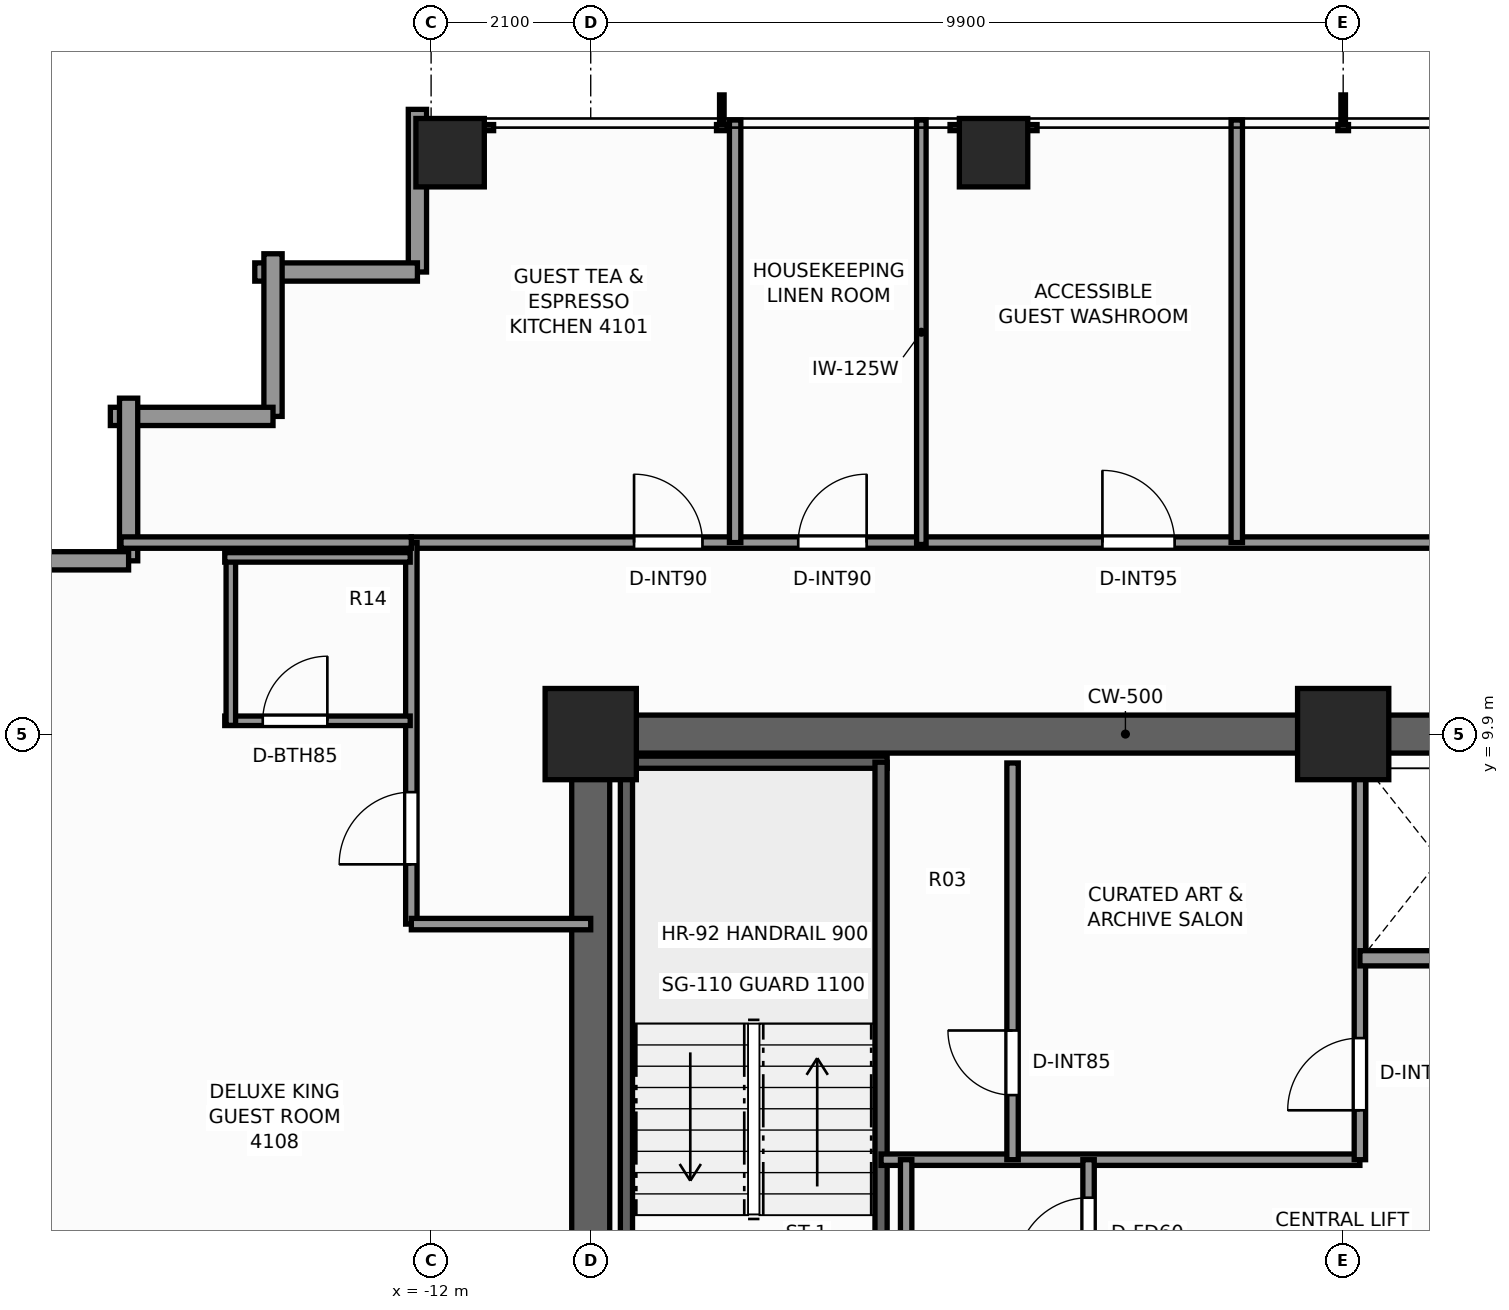
"""IFC4 building model, lengths in metres.
Left out: names, types, materials, properties, quantities, classifications, styles, units other than length and angle.
Written with IfcOpenShell. Run it as: python <this file> out.ifc"""

import sys

from ifc_helpers import new_model, si_unit, direction, frame, frame_2d, origin, origin_2d, place, context, subcontext, project, spatial, rectangle, extrude, element, fill, save


model = new_model("IFC4")
c1 = context("Model", 3, precision=1e-05, world=origin(), true_north=direction((0.0, 1.0)))
c2 = subcontext(c1, "Body", "Model", "MODEL_VIEW")
j1 = project(units=[si_unit("LENGTHUNIT", "METRE"), si_unit("PLANEANGLEUNIT", "RADIAN")], contexts=[c1])
p1 = place(None, origin())
s1 = spatial("IfcSite", under=j1, at=p1, CompositionType="ELEMENT")
p2 = place(p1, origin())
s2 = spatial("IfcBuilding", under=s1, at=p2, CompositionType="ELEMENT")
p3 = place(p2, frame((0.0, 0.0, 141.5)))
s3 = spatial("IfcBuildingStorey", under=s2, at=p3, CompositionType="ELEMENT", Elevation=141.5)
p4 = place(p3, frame((-10.15, 9.9, 0.0), z_axis=(0.0, 0.0, 1.0), x_axis=(1.0, 0.0, 0.0)))
e1 = element("IfcWall", 1, at=p4, inside=s3, PredefinedType="SHEAR", context=c2, shape_type="SweptSolid", body=[
    extrude(rectangle(XDim=14.57, YDim=0.5, at=frame_2d((7.285, 0.0))), origin(), (0.0, 0.0, 1.0), 3.3),
])
p5 = place(p3, frame((-9.9, -3.7, 0.0), z_axis=(0.0, 0.0, 1.0), x_axis=(0.0, 1.0, 0.0)))
e2 = element("IfcWall", 2, at=p5, inside=s3, PredefinedType="SHEAR", context=c2, shape_type="SweptSolid", body=[
    extrude(rectangle(XDim=13.35, YDim=0.5, at=frame_2d((6.675, 0.0))), origin(), (0.0, 0.0, 1.0), 3.3),
])
p6 = place(p5, frame((0.35, 0.0, 0.0)))
e3 = element("IfcOpeningElement", 3, at=p6, cuts=e2, PredefinedType="OPENING", context=c2, shape_type="SweptSolid", body=[
    extrude(rectangle(XDim=1.1, YDim=2.2, at=frame_2d((0.55, 1.1))), frame((0.0, 0.26, 0.0), z_axis=(0.0, -1.0, 0.0), x_axis=(1.0, 0.0, 0.0)), (0.0, 0.0, 1.0), 0.52),
])
for number, where, z_axis, x_axis in (
    (4, (-9.9, 9.9, 0.0), (0.0, 0.0, 1.0), (1.0, 0.0, 0.0)),
    (5, (0.0, 9.9, 0.0), (0.0, 0.0, 1.0), (1.0, 0.0, 0.0)),
):
    element("IfcColumn", number, at=place(p3, frame(where, z_axis=z_axis, x_axis=x_axis)), inside=s3, PredefinedType="COLUMN", context=c2, shape_type="SweptSolid", body=[
        extrude(rectangle(XDim=1.2, YDim=1.2, at=origin_2d()), origin(), (0.0, 0.0, 1.0), 3.3),
    ])
for number, where, z_axis, x_axis in (
    (6, (-11.75, 17.55, 0.0), (0.0, 0.0, 1.0), (1.0, 0.0, 0.0)),
    (7, (-4.6, 17.55, 0.0), (0.0, 0.0, 1.0), (1.0, 0.0, 0.0)),
):
    element("IfcColumn", number, at=place(p3, frame(where, z_axis=z_axis, x_axis=x_axis)), inside=s3, PredefinedType="COLUMN", context=c2, shape_type="SweptSolid", body=[
        extrude(rectangle(XDim=0.9, YDim=0.9, at=origin_2d()), origin(), (0.0, 0.0, 1.0), 3.3),
    ])
for number, where, z_axis, x_axis in (
    (8, (-12.18, 15.98, 0.0), (0.0, 0.0, 1.0), (0.0, 1.0, 0.0)),
    (9, (-14.32, 15.98, 0.0), (0.0, 0.0, 1.0), (1.0, 0.0, 0.0)),
):
    element("IfcWall", number, at=place(p3, frame(where, z_axis=z_axis, x_axis=x_axis)), inside=s3, PredefinedType="STANDARD", context=c2, shape_type="SweptSolid", body=[
        extrude(rectangle(XDim=2.14, YDim=0.24, at=frame_2d((1.07, 0.0))), origin(), (0.0, 0.0, 1.0), 2.479),
    ])
for number, where, z_axis, x_axis in (
    (10, (-14.08, 14.08, 0.0), (0.0, 0.0, 1.0), (0.0, 1.0, 0.0)),
    (11, (-16.22, 14.08, 0.0), (0.0, 0.0, 1.0), (1.0, 0.0, 0.0)),
):
    element("IfcWall", number, at=place(p3, frame(where, z_axis=z_axis, x_axis=x_axis)), inside=s3, PredefinedType="STANDARD", context=c2, shape_type="SweptSolid", body=[
        extrude(rectangle(XDim=2.14, YDim=0.24, at=frame_2d((1.07, 0.0))), origin(), (0.0, 0.0, 1.0), 2.479),
    ])
for number, where, z_axis, x_axis in (
    (12, (-15.98, 12.18, 0.0), (0.0, 0.0, 1.0), (0.0, 1.0, 0.0)),
    (13, (-18.12, 12.18, 0.0), (0.0, 0.0, 1.0), (1.0, 0.0, 0.0)),
):
    element("IfcWall", number, at=place(p3, frame(where, z_axis=z_axis, x_axis=x_axis)), inside=s3, PredefinedType="STANDARD", context=c2, shape_type="SweptSolid", body=[
        extrude(rectangle(XDim=2.14, YDim=0.24, at=frame_2d((1.07, 0.0))), origin(), (0.0, 0.0, 1.0), 2.479),
    ])
p7 = place(p3, frame((-9.52, 9.53, 0.0), z_axis=(0.0, 0.0, 1.0), x_axis=(1.0, 0.0, 0.0)))
e14 = element("IfcWall", 14, at=p7, inside=s3, PredefinedType="SHEAR", context=c2, shape_type="SweptSolid", body=[
    extrude(rectangle(XDim=3.52, YDim=0.16, at=frame_2d((1.76, 0.0))), origin(), (0.0, 0.0, 1.0), 3.3),
])
for number, where, z_axis, x_axis in (
    (15, (-9.43, 1.97, 0.0), (0.0, 0.0, 1.0), (0.0, 1.0, 0.0)),
    (16, (-6.08, 1.97, 0.0), (0.0, 0.0, 1.0), (0.0, 1.0, 0.0)),
):
    element("IfcWall", number, at=place(p3, frame(where, z_axis=z_axis, x_axis=x_axis)), inside=s3, PredefinedType="SHEAR", context=c2, shape_type="SweptSolid", body=[
        extrude(rectangle(XDim=7.56, YDim=0.16, at=frame_2d((3.78, 0.0))), origin(), (0.0, 0.0, 1.0), 3.3),
    ])
p8 = place(p3, frame((-6.08, 4.3, 0.0), z_axis=(0.0, 0.0, 1.0), x_axis=(1.0, 0.0, 0.0)))
e17 = element("IfcWall", 17, at=p8, inside=s3, PredefinedType="PARTITIONING", context=c2, shape_type="SweptSolid", body=[
    extrude(rectangle(XDim=6.3, YDim=0.15, at=frame_2d((3.15, 0.0))), origin(), (0.0, 0.0, 1.0), 3.1),
])
p9 = place(p3, frame((0.22, 4.3, 0.0), z_axis=(0.0, 0.0, 1.0), x_axis=(0.0, 1.0, 0.0)))
e18 = element("IfcWall", 18, at=p9, inside=s3, PredefinedType="PARTITIONING", context=c2, shape_type="SweptSolid", body=[
    extrude(rectangle(XDim=5.22, YDim=0.15, at=frame_2d((2.61, 0.0))), origin(), (0.0, 0.0, 1.0), 3.1),
])
p10 = place(p9, frame((0.65, 0.0, 0.0)))
e19 = element("IfcOpeningElement", 19, at=p10, cuts=e18, PredefinedType="OPENING", context=c2, shape_type="SweptSolid", body=[
    extrude(rectangle(XDim=0.95, YDim=2.06, at=frame_2d((0.475, 1.03))), frame((0.0, 0.085, 0.0), z_axis=(0.0, -1.0, 0.0), x_axis=(1.0, 0.0, 0.0)), (0.0, 0.0, 1.0), 0.17),
])
p11 = place(p3, frame((-4.35, 4.3, 0.0), z_axis=(0.0, 0.0, 1.0), x_axis=(0.0, 1.0, 0.0)))
e20 = element("IfcWall", 20, at=p11, inside=s3, PredefinedType="PARTITIONING", context=c2, shape_type="SweptSolid", body=[
    extrude(rectangle(XDim=5.22, YDim=0.15, at=frame_2d((2.61, 0.0))), origin(), (0.0, 0.0, 1.0), 3.1),
])
p12 = place(p11, frame((0.85, 0.0, 0.0)))
e21 = element("IfcOpeningElement", 21, at=p12, cuts=e20, PredefinedType="OPENING", context=c2, shape_type="SweptSolid", body=[
    extrude(rectangle(XDim=0.85, YDim=2.03, at=frame_2d((0.425, 1.015))), frame((0.0, 0.085, 0.0), z_axis=(0.0, -1.0, 0.0), x_axis=(1.0, 0.0, 0.0)), (0.0, 0.0, 1.0), 0.17),
])
p13 = place(p3, frame((0.22, 6.95, 0.0), z_axis=(0.0, 0.0, 1.0), x_axis=(1.0, 0.0, 0.0)))
e22 = element("IfcWall", 22, at=p13, inside=s3, PredefinedType="SOLIDWALL", context=c2, shape_type="SweptSolid", body=[
    extrude(rectangle(XDim=4.18, YDim=0.2, at=frame_2d((2.09, 0.0))), origin(), (0.0, 0.0, 1.0), 3.1),
])
p14 = place(p3, frame((-3.35, 1.1, 0.0), z_axis=(0.0, 0.0, 1.0), x_axis=(0.0, 1.0, 0.0)))
e23 = element("IfcWall", 23, at=p14, inside=s3, PredefinedType="PARTITIONING", context=c2, shape_type="SweptSolid", body=[
    extrude(rectangle(XDim=3.2, YDim=0.15, at=frame_2d((1.6, 0.0))), origin(), (0.0, 0.0, 1.0), 2.735),
])
p15 = place(p14, frame((1.75, 0.0, 0.0)))
e24 = element("IfcOpeningElement", 24, at=p15, cuts=e23, PredefinedType="OPENING", context=c2, shape_type="SweptSolid", body=[
    extrude(rectangle(XDim=0.95, YDim=2.06, at=frame_2d((0.475, 1.03))), frame((0.0, 0.085, 0.0), z_axis=(0.0, -1.0, 0.0), x_axis=(1.0, 0.0, 0.0)), (0.0, 0.0, 1.0), 0.17),
])
p16 = place(p3, frame((-5.75, 1.97, 0.0), z_axis=(0.0, 0.0, 1.0), x_axis=(0.0, 1.0, 0.0)))
e25 = element("IfcWall", 25, at=p16, inside=s3, PredefinedType="PARTITIONING", context=c2, shape_type="SweptSolid", body=[
    extrude(rectangle(XDim=2.33, YDim=0.15, at=frame_2d((1.165, 0.0))), origin(), (0.0, 0.0, 1.0), 2.735),
])
p17 = place(p3, frame((-12.26, 12.42, 0.0), z_axis=(0.0, 0.0, 1.0), x_axis=(1.0, 0.0, 0.0)))
e26 = element("IfcWall", 26, at=p17, inside=s3, PredefinedType="PARTITIONING", context=c2, shape_type="SweptSolid", body=[
    extrude(rectangle(XDim=24.68, YDim=0.15, at=frame_2d((12.34, 0.0))), origin(), (0.0, 0.0, 1.0), 2.312),
])
p18 = place(p17, frame((2.93, 0.0, 0.0)))
e27 = element("IfcOpeningElement", 27, at=p18, cuts=e26, PredefinedType="OPENING", context=c2, shape_type="SweptSolid", body=[
    extrude(rectangle(XDim=0.9, YDim=2.06, at=frame_2d((0.45, 1.03))), frame((0.0, 0.085, 0.0), z_axis=(0.0, -1.0, 0.0), x_axis=(1.0, 0.0, 0.0)), (0.0, 0.0, 1.0), 0.17),
])
p19 = place(p17, frame((5.09, 0.0, 0.0)))
e28 = element("IfcOpeningElement", 28, at=p19, cuts=e26, PredefinedType="OPENING", context=c2, shape_type="SweptSolid", body=[
    extrude(rectangle(XDim=0.9, YDim=2.06, at=frame_2d((0.45, 1.03))), frame((0.0, 0.085, 0.0), z_axis=(0.0, -1.0, 0.0), x_axis=(1.0, 0.0, 0.0)), (0.0, 0.0, 1.0), 0.17),
])
p20 = place(p17, frame((9.092, 0.0, 0.0)))
e29 = element("IfcOpeningElement", 29, at=p20, cuts=e26, PredefinedType="OPENING", context=c2, shape_type="SweptSolid", body=[
    extrude(rectangle(XDim=0.95, YDim=2.06, at=frame_2d((0.475, 1.03))), frame((0.0, 0.085, 0.0), z_axis=(0.0, -1.0, 0.0), x_axis=(1.0, 0.0, 0.0)), (0.0, 0.0, 1.0), 0.17),
])
p21 = place(p17, frame((13.84, 0.0, 0.0)))
e30 = element("IfcOpeningElement", 30, at=p21, cuts=e26, PredefinedType="OPENING", context=c2, shape_type="SweptSolid", body=[
    extrude(rectangle(XDim=0.9, YDim=2.06, at=frame_2d((0.45, 1.03))), frame((0.0, 0.085, 0.0), z_axis=(0.0, -1.0, 0.0), x_axis=(1.0, 0.0, 0.0)), (0.0, 0.0, 1.0), 0.17),
])
p22 = place(p17, frame((20.256, 0.0, 0.0)))
e31 = element("IfcOpeningElement", 31, at=p22, cuts=e26, PredefinedType="OPENING", context=c2, shape_type="SweptSolid", body=[
    extrude(rectangle(XDim=0.9, YDim=2.06, at=frame_2d((0.45, 1.03))), frame((0.0, 0.085, 0.0), z_axis=(0.0, -1.0, 0.0), x_axis=(1.0, 0.0, 0.0)), (0.0, 0.0, 1.0), 0.17),
])
p23 = place(p3, frame((-12.26, 7.4, 0.0), z_axis=(0.0, 0.0, 1.0), x_axis=(0.0, 1.0, 0.0)))
e32 = element("IfcWall", 32, at=p23, inside=s3, PredefinedType="PARTITIONING", context=c2, shape_type="SweptSolid", body=[
    extrude(rectangle(XDim=5.02, YDim=0.15, at=frame_2d((2.51, 0.0))), origin(), (0.0, 0.0, 1.0), 2.312),
])
p24 = place(p23, frame((0.786, 0.0, 0.0)))
e33 = element("IfcOpeningElement", 33, at=p24, cuts=e32, PredefinedType="OPENING", context=c2, shape_type="SweptSolid", body=[
    extrude(rectangle(XDim=0.95, YDim=2.06, at=frame_2d((0.475, 1.03))), frame((0.0, 0.085, 0.0), z_axis=(0.0, -1.0, 0.0), x_axis=(1.0, 0.0, 0.0)), (0.0, 0.0, 1.0), 0.17),
])
p25 = place(p3, frame((-12.26, 7.4, 0.0), z_axis=(0.0, 0.0, 1.0), x_axis=(1.0, 0.0, 0.0)))
e34 = element("IfcWall", 34, at=p25, inside=s3, PredefinedType="PARTITIONING", context=c2, shape_type="SweptSolid", body=[
    extrude(rectangle(XDim=2.36, YDim=0.15, at=frame_2d((1.18, 0.0))), origin(), (0.0, 0.0, 1.0), 3.1),
])
p26 = place(p3, frame((-16.08, 12.42, 0.0), z_axis=(0.0, 0.0, 1.0), x_axis=(1.0, 0.0, 0.0)))
e35 = element("IfcWall", 35, at=p26, inside=s3, PredefinedType="PARTITIONING", context=c2, shape_type="SweptSolid", body=[
    extrude(rectangle(XDim=3.82, YDim=0.15, at=frame_2d((1.91, 0.0))), origin(), (0.0, 0.0, 1.0), 3.1),
])
for number, where, z_axis, x_axis in (
    (36, (-8.0, 12.42, 0.0), (0.0, 0.0, 1.0), (0.0, 1.0, 0.0)),
    (37, (-1.4, 12.42, 0.0), (0.0, 0.0, 1.0), (0.0, 1.0, 0.0)),
):
    element("IfcWall", number, at=place(p3, frame(where, z_axis=z_axis, x_axis=x_axis)), inside=s3, PredefinedType="PARTITIONING", context=c2, shape_type="SweptSolid", body=[
        extrude(rectangle(XDim=5.56, YDim=0.15, at=frame_2d((2.78, 0.0))), origin(), (0.0, 0.0, 1.0), 2.469),
    ])
p27 = place(p3, frame((-5.55, 12.395, 0.0), z_axis=(0.0, 0.0, 1.0), x_axis=(0.0, 1.0, 0.0)))
e38 = element("IfcWall", 38, at=p27, inside=s3, PredefinedType="PARTITIONING", context=c2, shape_type="SweptSolid", body=[
    extrude(rectangle(XDim=5.585, YDim=0.125, at=frame_2d((2.792, 0.0))), origin(), (0.0, 0.0, 1.0), 2.469),
])
p28 = place(p3, frame((-14.715, 10.075, 0.0), z_axis=(0.0, 0.0, 1.0), x_axis=(1.0, 0.0, 0.0)))
e39 = element("IfcWall", 39, at=p28, inside=s3, PredefinedType="PARTITIONING", context=c2, shape_type="SweptSolid", body=[
    extrude(rectangle(XDim=2.44, YDim=0.125, at=frame_2d((1.22, 0.0))), origin(), (0.0, 0.0, 1.0), 3.1),
])
p29 = place(p28, frame((0.5, 0.0, 0.0)))
e40 = element("IfcOpeningElement", 40, at=p29, cuts=e39, PredefinedType="OPENING", context=c2, shape_type="SweptSolid", body=[
    extrude(rectangle(XDim=0.85, YDim=2.03, at=frame_2d((0.425, 1.015))), frame((0.0, 0.073, 0.0), z_axis=(0.0, -1.0, 0.0), x_axis=(1.0, 0.0, 0.0)), (0.0, 0.0, 1.0), 0.145),
])
p30 = place(p3, frame((-14.635, 10.015, 0.0), z_axis=(0.0, 0.0, 1.0), x_axis=(0.0, 1.0, 0.0)))
e41 = element("IfcWall", 41, at=p30, inside=s3, PredefinedType="PARTITIONING", context=c2, shape_type="SweptSolid", body=[
    extrude(rectangle(XDim=2.27, YDim=0.125, at=frame_2d((1.135, 0.0))), origin(), (0.0, 0.0, 1.0), 2.312),
])
p31 = place(p3, frame((-14.715, 12.225, 0.0), z_axis=(0.0, 0.0, 1.0), x_axis=(1.0, 0.0, 0.0)))
e42 = element("IfcWall", 42, at=p31, inside=s3, PredefinedType="PARTITIONING", context=c2, shape_type="SweptSolid", body=[
    extrude(rectangle(XDim=2.44, YDim=0.125, at=frame_2d((1.22, 0.0))), origin(), (0.0, 0.0, 1.0), 3.1),
])
p32 = place(p10, origin())
e43 = element("IfcDoor", 43, at=p32, inside=s3, OperationType="SINGLE_SWING_LEFT", PredefinedType="DOOR", context=c2, shape_type="SweptSolid", body=[
    extrude(rectangle(XDim=0.95, YDim=2.06, at=frame_2d((0.475, 1.03))), frame((0.0, 0.025, 0.0), z_axis=(0.0, -1.0, 0.0), x_axis=(1.0, 0.0, 0.0)), (0.0, 0.0, 1.0), 0.05),
])
fill(e19, e43)
p33 = place(p12, origin())
e44 = element("IfcDoor", 44, at=p33, inside=s3, OperationType="SINGLE_SWING_RIGHT", PredefinedType="DOOR", context=c2, shape_type="SweptSolid", body=[
    extrude(rectangle(XDim=0.85, YDim=2.03, at=frame_2d((0.425, 1.015))), frame((0.0, 0.025, 0.0), z_axis=(0.0, -1.0, 0.0), x_axis=(1.0, 0.0, 0.0)), (0.0, 0.0, 1.0), 0.05),
])
fill(e21, e44)
p34 = place(p15, origin())
e45 = element("IfcDoor", 45, at=p34, inside=s3, OperationType="SINGLE_SWING_LEFT", PredefinedType="DOOR", context=c2, shape_type="SweptSolid", body=[
    extrude(rectangle(XDim=0.95, YDim=2.06, at=frame_2d((0.475, 1.03))), frame((0.0, 0.025, 0.0), z_axis=(0.0, -1.0, 0.0), x_axis=(1.0, 0.0, 0.0)), (0.0, 0.0, 1.0), 0.05),
])
fill(e24, e45)
p35 = place(p18, origin())
e46 = element("IfcDoor", 46, at=p35, inside=s3, OperationType="SINGLE_SWING_LEFT", PredefinedType="DOOR", context=c2, shape_type="SweptSolid", body=[
    extrude(rectangle(XDim=0.9, YDim=2.06, at=frame_2d((0.45, 1.03))), frame((0.0, 0.025, 0.0), z_axis=(0.0, -1.0, 0.0), x_axis=(1.0, 0.0, 0.0)), (0.0, 0.0, 1.0), 0.05),
])
fill(e27, e46)
p36 = place(p19, origin())
e47 = element("IfcDoor", 47, at=p36, inside=s3, OperationType="SINGLE_SWING_RIGHT", PredefinedType="DOOR", context=c2, shape_type="SweptSolid", body=[
    extrude(rectangle(XDim=0.9, YDim=2.06, at=frame_2d((0.45, 1.03))), frame((0.0, 0.025, 0.0), z_axis=(0.0, -1.0, 0.0), x_axis=(1.0, 0.0, 0.0)), (0.0, 0.0, 1.0), 0.05),
])
fill(e28, e47)
p37 = place(p20, origin())
e48 = element("IfcDoor", 48, at=p37, inside=s3, OperationType="SINGLE_SWING_LEFT", PredefinedType="DOOR", context=c2, shape_type="SweptSolid", body=[
    extrude(rectangle(XDim=0.95, YDim=2.06, at=frame_2d((0.475, 1.03))), frame((0.0, 0.025, 0.0), z_axis=(0.0, -1.0, 0.0), x_axis=(1.0, 0.0, 0.0)), (0.0, 0.0, 1.0), 0.05),
])
fill(e29, e48)
p38 = place(p29, origin())
e49 = element("IfcDoor", 49, at=p38, inside=s3, OperationType="SINGLE_SWING_RIGHT", PredefinedType="DOOR", context=c2, shape_type="SweptSolid", body=[
    extrude(rectangle(XDim=0.85, YDim=2.03, at=frame_2d((0.425, 1.015))), frame((0.0, 0.025, 0.0), z_axis=(0.0, -1.0, 0.0), x_axis=(1.0, 0.0, 0.0)), (0.0, 0.0, 1.0), 0.05),
])
fill(e40, e49)
p39 = place(p24, origin())
e50 = element("IfcDoor", 50, at=p39, inside=s3, OperationType="SINGLE_SWING_LEFT", PredefinedType="DOOR", context=c2, shape_type="SweptSolid", body=[
    extrude(rectangle(XDim=0.95, YDim=2.06, at=frame_2d((0.475, 1.03))), frame((0.0, 0.025, 0.0), z_axis=(0.0, -1.0, 0.0), x_axis=(1.0, 0.0, 0.0)), (0.0, 0.0, 1.0), 0.05),
])
fill(e33, e50)
save(model, sys.argv[1])
